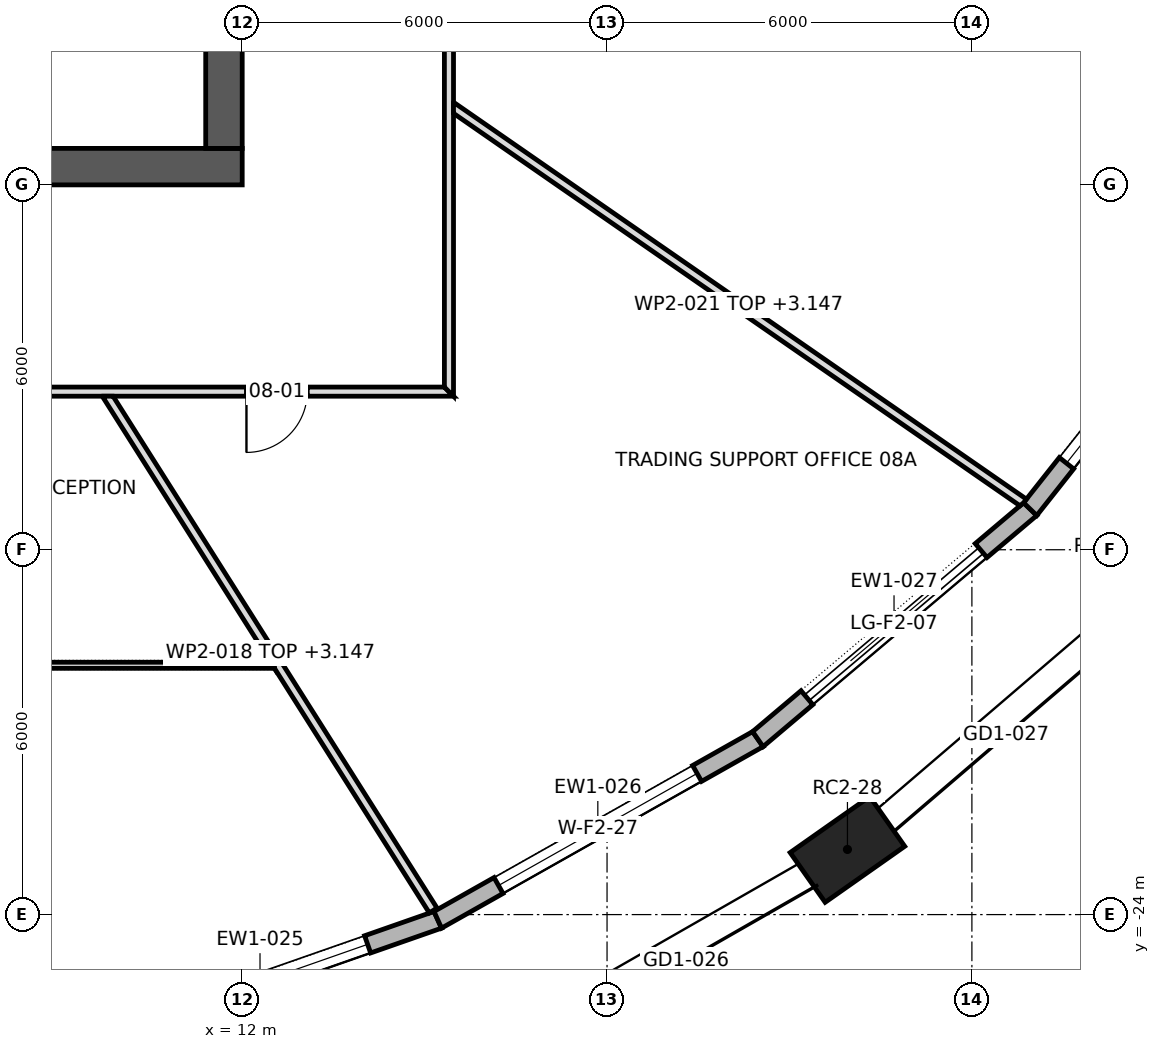
"""IFC4 building model, lengths in metres.
Left out: names, types, materials, properties, quantities, classifications, styles, units other than length and angle.
Written with IfcOpenShell. Run it as: python <this file> out.ifc"""

import sys

from ifc_helpers import new_model, si_unit, direction, frame, frame_2d, origin, origin_2d, place, context, subcontext, project, spatial, polyline, rectangle, outline, extrude, element, fill, save


model = new_model("IFC4")
c1 = context("Model", 3, precision=1e-05, world=origin(), true_north=direction((0.0, 1.0)))
c2 = subcontext(c1, "Body", "Model", "MODEL_VIEW")
j1 = project(units=[si_unit("LENGTHUNIT", "METRE"), si_unit("PLANEANGLEUNIT", "RADIAN")], contexts=[c1])
p1 = place(None, origin())
s1 = spatial("IfcSite", under=j1, at=p1, CompositionType="ELEMENT")
p2 = place(p1, origin())
s2 = spatial("IfcBuilding", under=s1, at=p2, CompositionType="ELEMENT")
p3 = place(p2, frame((0.0, 0.0, 125.5)))
s3 = spatial("IfcBuildingStorey", under=s2, at=p3, CompositionType="ELEMENT", Elevation=125.5)
p4 = place(p3, frame((21.953, -22.929, 0.0), z_axis=(0.0, 0.0, 1.0), x_axis=(0.817909792189, 0.575346479819, 0.0)))
e1 = element("IfcColumn", 1, at=p4, inside=s3, PredefinedType="COLUMN", context=c2, shape_type="SweptSolid", body=[
    extrude(rectangle(XDim=1.6, YDim=1.0, at=origin_2d()), origin(), (0.0, 0.0, 1.0), 4.2),
])
p5 = place(p3, frame((-12.0, -11.7, 0.0), z_axis=(0.0, 0.0, 1.0), x_axis=(1.0, 0.0, 0.0)))
e2 = element("IfcWall", 2, at=p5, inside=s3, PredefinedType="SHEAR", context=c2, shape_type="SweptSolid", body=[
    extrude(rectangle(XDim=24.0, YDim=0.6, at=frame_2d((12.0, 0.0))), origin(), (0.0, 0.0, 1.0), 4.2),
])
p6 = place(p5, frame((9.975, 0.0, 0.0)))
e3 = element("IfcOpeningElement", 3, at=p6, cuts=e2, PredefinedType="OPENING", context=c2, shape_type="SweptSolid", body=[
    extrude(rectangle(XDim=0.9, YDim=2.1, at=frame_2d((0.45, 1.05))), frame((0.0, 0.312, 0.0), z_axis=(0.0, -1.0, 0.0), x_axis=(1.0, 0.0, 0.0)), (0.0, 0.0, 1.0), 0.624),
])
p7 = place(p5, frame((3.8, 0.0, 0.0)))
e4 = element("IfcOpeningElement", 4, at=p7, cuts=e2, PredefinedType="OPENING", context=c2, shape_type="SweptSolid", body=[
    extrude(rectangle(XDim=0.8, YDim=2.1, at=frame_2d((0.4, 1.05))), frame((0.0, 0.312, 0.0), z_axis=(0.0, -1.0, 0.0), x_axis=(1.0, 0.0, 0.0)), (0.0, 0.0, 1.0), 0.624),
])
p8 = place(p5, frame((5.8, 0.0, 0.0)))
e5 = element("IfcOpeningElement", 5, at=p8, cuts=e2, PredefinedType="OPENING", context=c2, shape_type="SweptSolid", body=[
    extrude(rectangle(XDim=0.8, YDim=2.1, at=frame_2d((0.4, 1.05))), frame((0.0, 0.312, 0.0), z_axis=(0.0, -1.0, 0.0), x_axis=(1.0, 0.0, 0.0)), (0.0, 0.0, 1.0), 0.624),
])
p9 = place(p5, frame((7.5, 0.0, 0.0)))
e6 = element("IfcOpeningElement", 6, at=p9, cuts=e2, PredefinedType="OPENING", context=c2, shape_type="SweptSolid", body=[
    extrude(rectangle(XDim=0.8, YDim=2.1, at=frame_2d((0.4, 1.05))), frame((0.0, 0.312, 0.0), z_axis=(0.0, -1.0, 0.0), x_axis=(1.0, 0.0, 0.0)), (0.0, 0.0, 1.0), 0.624),
])
p10 = place(p5, frame((15.85, 0.0, 0.0)))
e7 = element("IfcOpeningElement", 7, at=p10, cuts=e2, PredefinedType="OPENING", context=c2, shape_type="SweptSolid", body=[
    extrude(rectangle(XDim=0.8, YDim=2.1, at=frame_2d((0.4, 1.05))), frame((0.0, 0.312, 0.0), z_axis=(0.0, -1.0, 0.0), x_axis=(1.0, 0.0, 0.0)), (0.0, 0.0, 1.0), 0.624),
])
p11 = place(p3, frame((11.7, -11.4, 0.0), z_axis=(0.0, 0.0, 1.0), x_axis=(0.0, 1.0, 0.0)))
e8 = element("IfcWall", 8, at=p11, inside=s3, PredefinedType="SHEAR", context=c2, shape_type="SweptSolid", body=[
    extrude(rectangle(XDim=22.8, YDim=0.6, at=frame_2d((11.4, 0.0))), origin(), (0.0, 0.0, 1.0), 4.2),
])
p12 = place(p11, frame((10.2, 0.0, 0.0)))
e9 = element("IfcOpeningElement", 9, at=p12, cuts=e8, PredefinedType="OPENING", context=c2, shape_type="SweptSolid", body=[
    extrude(rectangle(XDim=2.4, YDim=2.1, at=frame_2d((1.2, 1.05))), frame((0.0, 0.312, 0.0), z_axis=(0.0, -1.0, 0.0), x_axis=(1.0, 0.0, 0.0)), (0.0, 0.0, 1.0), 0.624),
])
p13 = place(p11, frame((19.5, 0.0, 0.0)))
e10 = element("IfcOpeningElement", 10, at=p13, cuts=e8, PredefinedType="OPENING", context=c2, shape_type="SweptSolid", body=[
    extrude(rectangle(XDim=1.2, YDim=2.1, at=frame_2d((0.6, 1.05))), frame((0.0, 0.312, 0.0), z_axis=(0.0, -1.0, 0.0), x_axis=(1.0, 0.0, 0.0)), (0.0, 0.0, 1.0), 0.624),
])
p14 = place(p11, frame((2.1, 0.0, 0.0)))
e11 = element("IfcOpeningElement", 11, at=p14, cuts=e8, PredefinedType="OPENING", context=c2, shape_type="SweptSolid", body=[
    extrude(rectangle(XDim=1.2, YDim=2.1, at=frame_2d((0.6, 1.05))), frame((0.0, 0.312, 0.0), z_axis=(0.0, -1.0, 0.0), x_axis=(1.0, 0.0, 0.0)), (0.0, 0.0, 1.0), 0.624),
])
p15 = place(p3, frame((9.369, -26.131, 0.0), z_axis=(0.0, 0.0, 1.0), x_axis=(0.94389706045, 0.330239820849, 0.0)))
e12 = element("IfcWall", 12, at=p15, inside=s3, PredefinedType="STANDARD", context=c2, shape_type="SweptSolid", body=[
    extrude(outline(polyline([(-0.013, -0.15), (6.208, -0.15), (6.181, 0.15), (0.013, 0.15), (-0.013, -0.15)])), origin(), (0.0, 0.0, 1.0), 3.9),
])
p16 = place(p15, frame((1.222, 0.0, 0.6)))
e13 = element("IfcOpeningElement", 13, at=p16, cuts=e12, PredefinedType="OPENING", context=c2, shape_type="SweptSolid", body=[
    extrude(rectangle(XDim=3.75, YDim=2.85, at=frame_2d((1.875, 1.425))), frame((0.0, 0.162, 0.0), z_axis=(0.0, -1.0, 0.0), x_axis=(1.0, 0.0, 0.0)), (0.0, 0.0, 1.0), 0.324),
])
p17 = place(p3, frame((15.216, -24.086, 0.0), z_axis=(0.0, 0.0, 1.0), x_axis=(0.870858332497, 0.491534093142, 0.0)))
e14 = element("IfcWall", 14, at=p17, inside=s3, PredefinedType="STANDARD", context=c2, shape_type="SweptSolid", body=[
    extrude(outline(polyline([(-0.013, -0.15), (6.058, -0.15), (6.03, 0.15), (0.013, 0.15), (-0.013, -0.15)])), origin(), (0.0, 0.0, 1.0), 3.9),
])
p18 = place(p17, frame((1.147, 0.0, 0.6)))
e15 = element("IfcOpeningElement", 15, at=p18, cuts=e14, PredefinedType="OPENING", context=c2, shape_type="SweptSolid", body=[
    extrude(rectangle(XDim=3.75, YDim=2.85, at=frame_2d((1.875, 1.425))), frame((0.0, 0.162, 0.0), z_axis=(0.0, -1.0, 0.0), x_axis=(1.0, 0.0, 0.0)), (0.0, 0.0, 1.0), 0.324),
])
p19 = place(p3, frame((20.48, -21.115, 0.0), z_axis=(0.0, 0.0, 1.0), x_axis=(0.763937302001, 0.645290476151, 0.0)))
e16 = element("IfcWall", 16, at=p19, inside=s3, PredefinedType="STANDARD", context=c2, shape_type="SweptSolid", body=[
    extrude(outline(polyline([(-0.014, -0.15), (5.877, -0.15), (5.847, 0.15), (0.014, 0.15), (-0.014, -0.15)])), origin(), (0.0, 0.0, 1.0), 3.9),
])
p20 = place(p19, frame((1.056, 0.0, 0.0)))
e17 = element("IfcOpeningElement", 17, at=p20, cuts=e16, PredefinedType="OPENING", context=c2, shape_type="SweptSolid", body=[
    extrude(rectangle(XDim=3.75, YDim=3.45, at=frame_2d((1.875, 1.725))), frame((0.0, 0.162, 0.0), z_axis=(0.0, -1.0, 0.0), x_axis=(1.0, 0.0, 0.0)), (0.0, 0.0, 1.0), 0.324),
])
p21 = place(p3, frame((24.958, -17.332, 0.0), z_axis=(0.0, 0.0, 1.0), x_axis=(0.62038332391, 0.784298751379, 0.0)))
e18 = element("IfcWall", 18, at=p21, inside=s3, PredefinedType="STANDARD", context=c2, shape_type="SweptSolid", body=[
    extrude(outline(polyline([(-0.015, -0.15), (5.691, -0.15), (5.659, 0.15), (0.015, 0.15), (-0.015, -0.15)])), origin(), (0.0, 0.0, 1.0), 3.9),
])
p22 = place(p21, frame((0.962, 0.0, 0.6)))
e19 = element("IfcOpeningElement", 19, at=p22, cuts=e18, PredefinedType="OPENING", context=c2, shape_type="SweptSolid", body=[
    extrude(rectangle(XDim=3.75, YDim=2.85, at=frame_2d((1.875, 1.425))), frame((0.0, 0.162, 0.0), z_axis=(0.0, -1.0, 0.0), x_axis=(1.0, 0.0, 0.0)), (0.0, 0.0, 1.0), 0.324),
])
p23 = place(p3, frame((-15.475, -15.4, 0.0), z_axis=(0.0, 0.0, 1.0), x_axis=(1.0, 0.0, 0.0)))
e20 = element("IfcWall", 20, at=p23, inside=s3, PredefinedType="PARTITIONING", context=c2, shape_type="SweptSolid", body=[
    extrude(outline(polyline([(0.0, -0.075), (1.935, -0.075), (3.869, -0.075), (5.803, -0.075), (7.738, -0.075), (9.672, -0.075), (11.606, -0.075), (13.541, -0.075), (15.475, -0.075), (17.409, -0.075), (19.344, -0.075), (21.278, -0.075), (23.212, -0.075), (25.147, -0.075), (27.081, -0.075), (29.016, -0.075), (30.95, -0.075), (30.8, 0.075), (28.885, 0.075), (26.969, 0.075), (25.053, 0.075), (23.138, 0.075), (21.222, 0.075), (19.306, 0.075), (17.391, 0.075), (15.475, 0.075), (13.56, 0.075), (11.644, 0.075), (9.728, 0.075), (7.812, 0.075), (5.897, 0.075), (3.981, 0.075), (2.066, 0.075), (0.15, 0.075), (0.0, -0.075)])), origin(), (0.0, 0.0, 1.0), 3.9),
])
p24 = place(p23, frame((27.545, 0.0, 0.0)))
e21 = element("IfcOpeningElement", 21, at=p24, cuts=e20, PredefinedType="OPENING", context=c2, shape_type="SweptSolid", body=[
    extrude(rectangle(XDim=1.0, YDim=2.1, at=frame_2d((0.5, 1.05))), frame((0.0, 0.087, 0.0), z_axis=(0.0, -1.0, 0.0), x_axis=(1.0, 0.0, 0.0)), (0.0, 0.0, 1.0), 0.174),
])
p25 = place(p23, frame((5.975, 0.0, 0.0)))
e22 = element("IfcOpeningElement", 22, at=p25, cuts=e20, PredefinedType="OPENING", context=c2, shape_type="SweptSolid", body=[
    extrude(rectangle(XDim=1.8, YDim=2.1, at=frame_2d((0.9, 1.05))), frame((0.0, 0.087, 0.0), z_axis=(0.0, -1.0, 0.0), x_axis=(1.0, 0.0, 0.0)), (0.0, 0.0, 1.0), 0.174),
])
p26 = place(p23, frame((20.78, 0.0, 0.0)))
e23 = element("IfcOpeningElement", 23, at=p26, cuts=e20, PredefinedType="OPENING", context=c2, shape_type="SweptSolid", body=[
    extrude(rectangle(XDim=1.0, YDim=2.1, at=frame_2d((0.5, 1.05))), frame((0.0, 0.087, 0.0), z_axis=(0.0, -1.0, 0.0), x_axis=(1.0, 0.0, 0.0)), (0.0, 0.0, 1.0), 0.174),
])
p27 = place(p23, frame((15.01, 0.0, 0.0)))
e24 = element("IfcOpeningElement", 24, at=p27, cuts=e20, PredefinedType="OPENING", context=c2, shape_type="SweptSolid", body=[
    extrude(rectangle(XDim=1.0, YDim=2.1, at=frame_2d((0.5, 1.05))), frame((0.0, 0.087, 0.0), z_axis=(0.0, -1.0, 0.0), x_axis=(1.0, 0.0, 0.0)), (0.0, 0.0, 1.0), 0.174),
])
p28 = place(p3, frame((-2.25, -19.9, 0.0), z_axis=(0.0, 0.0, 1.0), x_axis=(1.0, 0.0, 0.0)))
e25 = element("IfcWall", 25, at=p28, inside=s3, PredefinedType="PARTITIONING", context=c2, shape_type="SweptSolid", body=[
    extrude(outline(polyline([(14.781, -0.05), (14.781, -0.05), (14.77, -0.032), (14.77, -0.032), (14.718, 0.05), (12.96, 0.05), (11.202, 0.05), (9.444, 0.05), (7.686, 0.05), (5.928, 0.05), (4.17, 0.05), (4.17, 0.05), (4.07, 0.05), (4.07, 0.05), (2.717, 0.05), (1.364, 0.05), (0.011, 0.05), (0.0, -0.048), (0.0, -0.05), (1.848, -0.05), (3.695, -0.05), (5.543, -0.05), (7.391, -0.05), (9.238, -0.05), (11.086, -0.05), (12.933, -0.05), (14.781, -0.05)])), origin(), (0.0, 0.0, 1.0), 3.9),
])
p29 = place(p28, frame((9.03, 0.0, 0.0)))
e26 = element("IfcOpeningElement", 26, at=p29, cuts=e25, PredefinedType="OPENING", context=c2, shape_type="SweptSolid", body=[
    extrude(rectangle(XDim=0.9, YDim=2.1, at=frame_2d((0.45, 1.05))), frame((0.0, 0.062, 0.0), z_axis=(0.0, -1.0, 0.0), x_axis=(1.0, 0.0, 0.0)), (0.0, 0.0, 1.0), 0.124),
])
p30 = place(p3, frame((9.762, -15.435, 0.0), z_axis=(0.0, 0.0, 1.0), x_axis=(0.534830284385, -0.844959506074, 0.0)))
e27 = element("IfcWall", 27, at=p30, inside=s3, PredefinedType="PARTITIONING", context=c2, shape_type="SweptSolid", body=[
    extrude(outline(polyline([(0.0, -0.075), (1.726, -0.075), (3.452, -0.075), (5.177, -0.075), (5.211, -0.022), (5.295, -0.075), (6.883, -0.075), (8.47, -0.075), (10.057, -0.075), (10.057, 0.075), (8.064, 0.075), (6.072, 0.075), (4.08, 0.075), (2.087, 0.075), (0.095, 0.075), (0.0, -0.075), (0.0, -0.075)])), origin(), (0.0, 0.0, 1.0), 3.147),
])
p31 = place(p3, frame((15.4, -15.475, 0.0), z_axis=(0.0, 0.0, 1.0), x_axis=(0.0, 1.0, 0.0)))
e28 = element("IfcWall", 28, at=p31, inside=s3, PredefinedType="PARTITIONING", context=c2, shape_type="SweptSolid", body=[
    extrude(outline(polyline([(0.0, -0.075), (1.935, -0.075), (3.869, -0.075), (5.803, -0.075), (7.738, -0.075), (9.672, -0.075), (11.606, -0.075), (13.541, -0.075), (15.475, -0.075), (17.409, -0.075), (19.344, -0.075), (21.278, -0.075), (23.212, -0.075), (25.147, -0.075), (27.081, -0.075), (29.016, -0.075), (30.95, -0.075), (30.8, 0.075), (28.885, 0.075), (26.969, 0.075), (25.053, 0.075), (23.138, 0.075), (21.222, 0.075), (19.306, 0.075), (17.391, 0.075), (15.475, 0.075), (13.56, 0.075), (11.644, 0.075), (9.728, 0.075), (7.812, 0.075), (5.897, 0.075), (3.981, 0.075), (2.066, 0.075), (0.15, 0.075), (0.0, -0.075)])), origin(), (0.0, 0.0, 1.0), 3.9),
])
p32 = place(p31, frame((8.595, 0.0, 0.0)))
e29 = element("IfcOpeningElement", 29, at=p32, cuts=e28, PredefinedType="OPENING", context=c2, shape_type="SweptSolid", body=[
    extrude(rectangle(XDim=1.8, YDim=2.1, at=frame_2d((0.9, 1.05))), frame((0.0, 0.087, 0.0), z_axis=(0.0, -1.0, 0.0), x_axis=(1.0, 0.0, 0.0)), (0.0, 0.0, 1.0), 0.174),
])
p33 = place(p31, frame((17.81, 0.0, 0.0)))
e30 = element("IfcOpeningElement", 30, at=p33, cuts=e28, PredefinedType="OPENING", context=c2, shape_type="SweptSolid", body=[
    extrude(rectangle(XDim=1.0, YDim=2.1, at=frame_2d((0.5, 1.05))), frame((0.0, 0.087, 0.0), z_axis=(0.0, -1.0, 0.0), x_axis=(1.0, 0.0, 0.0)), (0.0, 0.0, 1.0), 0.174),
])
p34 = place(p31, frame((25.75, 0.0, 0.0)))
e31 = element("IfcOpeningElement", 31, at=p34, cuts=e28, PredefinedType="OPENING", context=c2, shape_type="SweptSolid", body=[
    extrude(rectangle(XDim=1.8, YDim=2.1, at=frame_2d((0.9, 1.05))), frame((0.0, 0.087, 0.0), z_axis=(0.0, -1.0, 0.0), x_axis=(1.0, 0.0, 0.0)), (0.0, 0.0, 1.0), 0.174),
])
p35 = place(p3, frame((15.433, -10.702, 0.0), z_axis=(0.0, 0.0, 1.0), x_axis=(0.82200427234, -0.56948132213, 0.0)))
e32 = element("IfcWall", 32, at=p35, inside=s3, PredefinedType="PARTITIONING", context=c2, shape_type="SweptSolid", body=[
    extrude(outline(polyline([(0.104, -0.075), (1.992, -0.075), (3.881, -0.075), (5.77, -0.075), (7.659, -0.075), (9.548, -0.075), (11.437, -0.075), (11.457, 0.0), (11.461, 0.071), (11.461, 0.075), (9.551, 0.075), (7.641, 0.075), (5.731, 0.075), (3.821, 0.075), (1.91, 0.075), (0.0, 0.075), (0.0, 0.074), (0.104, -0.075)])), origin(), (0.0, 0.0, 1.0), 3.147),
])
p36 = place(p16, origin())
e33 = element("IfcWindow", 33, at=p36, inside=s3, PartitioningType="TRIPLE_PANEL_VERTICAL", PredefinedType="WINDOW", context=c2, shape_type="SweptSolid", body=[
    extrude(rectangle(XDim=3.75, YDim=2.85, at=frame_2d((1.875, 1.425))), frame((0.0, 0.03, 0.0), z_axis=(0.0, -1.0, 0.0), x_axis=(1.0, 0.0, 0.0)), (0.0, 0.0, 1.0), 0.06),
])
fill(e13, e33)
p37 = place(p18, origin())
e34 = element("IfcWindow", 34, at=p37, inside=s3, PartitioningType="TRIPLE_PANEL_VERTICAL", PredefinedType="WINDOW", context=c2, shape_type="SweptSolid", body=[
    extrude(rectangle(XDim=3.75, YDim=2.85, at=frame_2d((1.875, 1.425))), frame((0.0, 0.03, 0.0), z_axis=(0.0, -1.0, 0.0), x_axis=(1.0, 0.0, 0.0)), (0.0, 0.0, 1.0), 0.06),
])
fill(e15, e34)
p38 = place(p20, origin())
e35 = element("IfcDoor", 35, at=p38, inside=s3, OperationType="DOUBLE_DOOR_SLIDING", PredefinedType="DOOR", context=c2, shape_type="SweptSolid", body=[
    extrude(rectangle(XDim=3.75, YDim=3.45, at=frame_2d((1.875, 1.725))), frame((0.0, 0.025, 0.0), z_axis=(0.0, -1.0, 0.0), x_axis=(1.0, 0.0, 0.0)), (0.0, 0.0, 1.0), 0.05),
])
fill(e17, e35)
p39 = place(p22, origin())
e36 = element("IfcWindow", 36, at=p39, inside=s3, PartitioningType="TRIPLE_PANEL_VERTICAL", PredefinedType="WINDOW", context=c2, shape_type="SweptSolid", body=[
    extrude(rectangle(XDim=3.75, YDim=2.85, at=frame_2d((1.875, 1.425))), frame((0.0, 0.03, 0.0), z_axis=(0.0, -1.0, 0.0), x_axis=(1.0, 0.0, 0.0)), (0.0, 0.0, 1.0), 0.06),
])
fill(e19, e36)
p40 = place(p24, frame((1.0, 0.0, 0.0), z_axis=(0.0, 0.0, 1.0), x_axis=(-1.0, 0.0, 0.0)))
e37 = element("IfcDoor", 37, at=p40, inside=s3, OperationType="SINGLE_SWING_LEFT", PredefinedType="DOOR", context=c2, shape_type="SweptSolid", body=[
    extrude(rectangle(XDim=1.0, YDim=2.1, at=frame_2d((0.5, 1.05))), frame((0.0, 0.025, 0.0), z_axis=(0.0, -1.0, 0.0), x_axis=(1.0, 0.0, 0.0)), (0.0, 0.0, 1.0), 0.05),
])
fill(e21, e37)
save(model, sys.argv[1])
